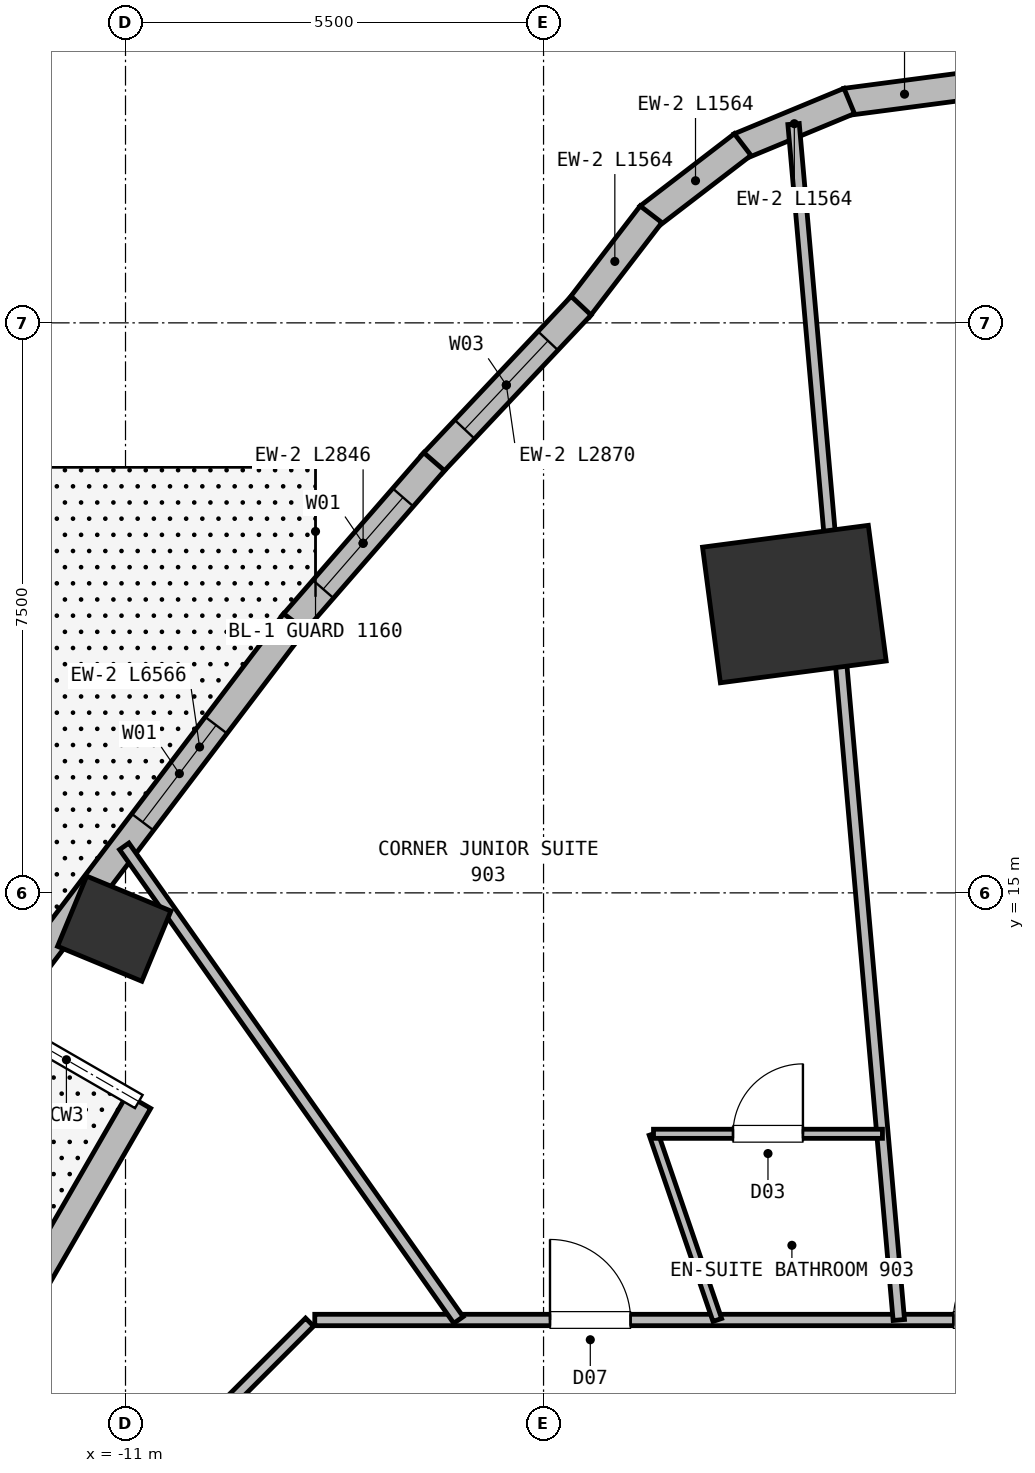
"""IFC4 building model, lengths in metres.
Left out: names, types, materials, properties, quantities, classifications, styles, units other than length and angle.
Written with IfcOpenShell. Run it as: python <this file> out.ifc"""

import sys

from ifc_helpers import new_model, si_unit, direction, frame, frame_2d, origin, origin_2d, place, context, subcontext, project, spatial, rectangle, extrude, element, fill, save


model = new_model("IFC4")
c1 = context("Model", 3, precision=1e-05, world=origin(), true_north=direction((0.0, 1.0)))
c2 = subcontext(c1, "Body", "Model", "MODEL_VIEW")
j1 = project(units=[si_unit("LENGTHUNIT", "METRE"), si_unit("PLANEANGLEUNIT", "RADIAN")], contexts=[c1])
p1 = place(None, origin())
s1 = spatial("IfcSite", under=j1, at=p1, CompositionType="ELEMENT")
p2 = place(p1, origin())
s2 = spatial("IfcBuilding", under=s1, at=p2, CompositionType="ELEMENT")
p3 = place(p2, frame((0.0, 0.0, 30.5)))
s3 = spatial("IfcBuildingStorey", under=s2, at=p3, CompositionType="ELEMENT", Elevation=30.5)
p4 = place(p3, frame((-2.2, 18.8, 0.0), z_axis=(0.0, 0.0, 1.0), x_axis=(-0.13052619222, 0.991444861374, 0.0)))
e1 = element("IfcColumn", 1, at=p4, inside=s3, PredefinedType="COLUMN", context=c2, shape_type="SweptSolid", body=[
    extrude(rectangle(XDim=1.8, YDim=2.2, at=origin_2d()), origin(), (0.0, 0.0, 1.0), 3.75),
])
p5 = place(p3, frame((-11.148, 14.529, 0.0), z_axis=(0.0, 0.0, 1.0), x_axis=(0.382683432365, 0.923879532511, 0.0)))
e2 = element("IfcColumn", 2, at=p5, inside=s3, PredefinedType="COLUMN", context=c2, shape_type="SweptSolid", body=[
    extrude(rectangle(XDim=1.0, YDim=1.2, at=origin_2d()), origin(), (0.0, 0.0, 1.0), 3.75),
])
p6 = place(p3, frame((-16.025, 3.248, 0.0), z_axis=(0.0, 0.0, 1.0), x_axis=(0.499999493275, 0.866025696342, 0.0)))
e3 = element("IfcWall", 3, at=p6, inside=s3, PredefinedType="SOLIDWALL", context=c2, shape_type="SweptSolid", body=[
    extrude(rectangle(XDim=10.4, YDim=0.36, at=frame_2d((5.2, 0.0))), origin(), (0.0, 0.0, 1.0), 3.5),
])
p7 = place(p6, frame((4.375, 0.0, 0.0)))
e4 = element("IfcOpeningElement", 4, at=p7, cuts=e3, PredefinedType="OPENING", context=c2, shape_type="SweptSolid", body=[
    extrude(rectangle(XDim=1.65, YDim=2.25, at=frame_2d((0.825, 1.125))), frame((0.0, 0.19, 0.0), z_axis=(0.0, -1.0, 0.0), x_axis=(1.0, 0.0, 0.0)), (0.0, 0.0, 1.0), 0.38),
])
for number, where, z_axis, x_axis in (
    (5, (-1.526, 25.407, 0.0), (0.0, 0.0, 1.0), (0.991, 0.13, 0.0)),
    (6, (-2.923, 24.821, 0.0), (0.0, 0.0, 1.0), (0.924, 0.383, 0.0)),
    (7, (-4.121, 23.894, 0.0), (0.0, 0.0, 1.0), (0.793, 0.609, 0.0)),
    (8, (-5.038, 22.688, 0.0), (0.0, 0.0, 1.0), (0.609, 0.793, 0.0)),
):
    element("IfcWall", number, at=place(p3, frame(where, z_axis=z_axis, x_axis=x_axis)), inside=s3, PredefinedType="SOLIDWALL", context=c2, shape_type="SweptSolid", body=[
        extrude(rectangle(XDim=1.564, YDim=0.36, at=frame_2d((0.782, 0.0))), origin(), (0.0, 0.0, 1.0), 3.5),
    ])
p8 = place(p3, frame((-6.973, 20.637, 0.0), z_axis=(0.0, 0.0, 1.0), x_axis=(0.685563685899, 0.728012659626, 0.0)))
e9 = element("IfcWall", 9, at=p8, inside=s3, PredefinedType="SOLIDWALL", context=c2, shape_type="SweptSolid", body=[
    extrude(rectangle(XDim=2.87, YDim=0.36, at=frame_2d((1.435, 0.0))), origin(), (0.0, 0.0, 1.0), 3.5),
])
p9 = place(p8, frame((0.635, 0.0, 0.72)))
e10 = element("IfcOpeningElement", 10, at=p9, cuts=e9, PredefinedType="OPENING", context=c2, shape_type="SweptSolid", body=[
    extrude(rectangle(XDim=1.6, YDim=1.88, at=frame_2d((0.8, 0.94))), frame((0.0, 0.19, 0.0), z_axis=(0.0, -1.0, 0.0), x_axis=(1.0, 0.0, 0.0)), (0.0, 0.0, 1.0), 0.38),
])
p10 = place(p3, frame((-8.808, 18.526, 0.0), z_axis=(0.0, 0.0, 1.0), x_axis=(0.656480194697, 0.754343260042, 0.0)))
e11 = element("IfcWall", 11, at=p10, inside=s3, PredefinedType="SOLIDWALL", context=c2, shape_type="SweptSolid", body=[
    extrude(rectangle(XDim=2.846, YDim=0.36, at=frame_2d((1.423, 0.0))), origin(), (0.0, 0.0, 1.0), 3.5),
])
p11 = place(p10, frame((0.623, 0.0, 0.72)))
e12 = element("IfcOpeningElement", 12, at=p11, cuts=e11, PredefinedType="OPENING", context=c2, shape_type="SweptSolid", body=[
    extrude(rectangle(XDim=1.6, YDim=1.88, at=frame_2d((0.8, 0.94))), frame((0.0, 0.19, 0.0), z_axis=(0.0, -1.0, 0.0), x_axis=(1.0, 0.0, 0.0)), (0.0, 0.0, 1.0), 0.38),
])
p12 = place(p3, frame((-12.745, 13.334, 0.0), z_axis=(0.0, 0.0, 1.0), x_axis=(0.604405198851, 0.796677071091, 0.0)))
e13 = element("IfcWall", 13, at=p12, inside=s3, PredefinedType="SOLIDWALL", context=c2, shape_type="SweptSolid", body=[
    extrude(rectangle(XDim=6.566, YDim=0.36, at=frame_2d((3.283, 0.0))), origin(), (0.0, 0.0, 1.0), 2.93),
])
p13 = place(p12, frame((3.26, 0.0, 0.72)))
e14 = element("IfcOpeningElement", 14, at=p13, cuts=e13, PredefinedType="OPENING", context=c2, shape_type="SweptSolid", body=[
    extrude(rectangle(XDim=1.6, YDim=1.88, at=frame_2d((0.8, 0.94))), frame((0.0, 0.19, 0.0), z_axis=(0.0, -1.0, 0.0), x_axis=(1.0, 0.0, 0.0)), (0.0, 0.0, 1.0), 0.38),
])
p14 = place(p3, frame((-8.51, 9.38, 0.0), z_axis=(0.0, 0.0, 1.0), x_axis=(1.0, 0.0, 0.0)))
e15 = element("IfcWall", 15, at=p14, inside=s3, PredefinedType="PARTITIONING", context=c2, shape_type="SweptSolid", body=[
    extrude(rectangle(XDim=17.02, YDim=0.15, at=frame_2d((8.51, 0.0))), origin(), (0.0, 0.0, 1.0), 3.5),
])
p15 = place(p14, frame((13.545, 0.0, 0.0)))
e16 = element("IfcOpeningElement", 16, at=p15, cuts=e15, PredefinedType="OPENING", context=c2, shape_type="SweptSolid", body=[
    extrude(rectangle(XDim=1.0, YDim=2.15, at=frame_2d((0.5, 1.075))), frame((0.0, 0.085, 0.0), z_axis=(0.0, -1.0, 0.0), x_axis=(1.0, 0.0, 0.0)), (0.0, 0.0, 1.0), 0.17),
])
p16 = place(p14, frame((3.095, 0.0, 0.0)))
e17 = element("IfcOpeningElement", 17, at=p16, cuts=e15, PredefinedType="OPENING", context=c2, shape_type="SweptSolid", body=[
    extrude(rectangle(XDim=1.06, YDim=2.15, at=frame_2d((0.53, 1.075))), frame((0.0, 0.085, 0.0), z_axis=(0.0, -1.0, 0.0), x_axis=(1.0, 0.0, 0.0)), (0.0, 0.0, 1.0), 0.17),
])
p17 = place(p14, frame((8.402, 0.0, 0.0)))
e18 = element("IfcOpeningElement", 18, at=p17, cuts=e15, PredefinedType="OPENING", context=c2, shape_type="SweptSolid", body=[
    extrude(rectangle(XDim=1.06, YDim=2.15, at=frame_2d((0.53, 1.075))), frame((0.0, 0.085, 0.0), z_axis=(0.0, -1.0, 0.0), x_axis=(1.0, 0.0, 0.0)), (0.0, 0.0, 1.0), 0.17),
])
p18 = place(p3, frame((-10.752, 7.178, 0.0), z_axis=(0.0, 0.0, 1.0), x_axis=(0.707067066127, 0.707146494016, 0.0)))
e19 = element("IfcWall", 19, at=p18, inside=s3, PredefinedType="PARTITIONING", context=c2, shape_type="SweptSolid", body=[
    extrude(rectangle(XDim=3.074, YDim=0.15, at=frame_2d((1.537, 0.0))), origin(), (0.0, 0.0, 1.0), 3.5),
])
p19 = place(p3, frame((-0.826, 9.38, 0.0), z_axis=(0.0, 0.0, 1.0), x_axis=(-0.087674603254, 0.996149167517, 0.0)))
e20 = element("IfcWall", 20, at=p19, inside=s3, PredefinedType="PARTITIONING", context=c2, shape_type="SweptSolid", body=[
    extrude(rectangle(XDim=15.797, YDim=0.15, at=frame_2d((7.898, 0.0))), origin(), (0.0, 0.0, 1.0), 3.5),
])
p20 = place(p3, frame((-4.053, 11.83, 0.0), z_axis=(0.0, 0.0, 1.0), x_axis=(0.324078497959, -0.946030193578, 0.0)))
e21 = element("IfcWall", 21, at=p20, inside=s3, PredefinedType="PARTITIONING", context=c2, shape_type="SweptSolid", body=[
    extrude(rectangle(XDim=2.59, YDim=0.12, at=frame_2d((1.295, 0.0))), origin(), (0.0, 0.0, 1.0), 3.5),
])
p21 = place(p3, frame((-4.053, 11.83, 0.0), z_axis=(0.0, 0.0, 1.0), x_axis=(1.0, 0.0, 0.0)))
e22 = element("IfcWall", 22, at=p21, inside=s3, PredefinedType="PARTITIONING", context=c2, shape_type="SweptSolid", body=[
    extrude(rectangle(XDim=3.012, YDim=0.12, at=frame_2d((1.506, 0.0))), origin(), (0.0, 0.0, 1.0), 3.5),
])
p22 = place(p21, frame((1.046, 0.0, 0.0)))
e23 = element("IfcOpeningElement", 23, at=p22, cuts=e22, PredefinedType="OPENING", context=c2, shape_type="SweptSolid", body=[
    extrude(rectangle(XDim=0.92, YDim=2.1, at=frame_2d((0.46, 1.05))), frame((0.0, 0.07, 0.0), z_axis=(0.0, -1.0, 0.0), x_axis=(1.0, 0.0, 0.0)), (0.0, 0.0, 1.0), 0.14),
])
p23 = place(p3, frame((-6.619, 9.38, 0.0), z_axis=(0.0, 0.0, 1.0), x_axis=(-0.576560044714, 0.817054780807, 0.0)))
e24 = element("IfcWall", 24, at=p23, inside=s3, PredefinedType="PARTITIONING", context=c2, shape_type="SweptSolid", body=[
    extrude(rectangle(XDim=7.628, YDim=0.15, at=frame_2d((3.814, 0.0))), origin(), (0.0, 0.0, 1.0), 3.5),
])
p24 = place(p9, origin())
e25 = element("IfcWindow", 25, at=p24, inside=s3, PartitioningType="SINGLE_PANEL", PredefinedType="WINDOW", context=c2, shape_type="SweptSolid", body=[
    extrude(rectangle(XDim=1.6, YDim=1.88, at=frame_2d((0.8, 0.94))), frame((0.0, 0.03, 0.0), z_axis=(0.0, -1.0, 0.0), x_axis=(1.0, 0.0, 0.0)), (0.0, 0.0, 1.0), 0.06),
])
fill(e10, e25)
p25 = place(p11, origin())
e26 = element("IfcWindow", 26, at=p25, inside=s3, PartitioningType="SINGLE_PANEL", PredefinedType="WINDOW", context=c2, shape_type="SweptSolid", body=[
    extrude(rectangle(XDim=1.6, YDim=1.88, at=frame_2d((0.8, 0.94))), frame((0.0, 0.03, 0.0), z_axis=(0.0, -1.0, 0.0), x_axis=(1.0, 0.0, 0.0)), (0.0, 0.0, 1.0), 0.06),
])
fill(e12, e26)
p26 = place(p13, origin())
e27 = element("IfcWindow", 27, at=p26, inside=s3, PartitioningType="SINGLE_PANEL", PredefinedType="WINDOW", context=c2, shape_type="SweptSolid", body=[
    extrude(rectangle(XDim=1.6, YDim=1.88, at=frame_2d((0.8, 0.94))), frame((0.0, 0.03, 0.0), z_axis=(0.0, -1.0, 0.0), x_axis=(1.0, 0.0, 0.0)), (0.0, 0.0, 1.0), 0.06),
])
fill(e14, e27)
p27 = place(p22, origin())
e28 = element("IfcDoor", 28, at=p27, inside=s3, OperationType="SINGLE_SWING_RIGHT", PredefinedType="DOOR", context=c2, shape_type="SweptSolid", body=[
    extrude(rectangle(XDim=0.92, YDim=2.1, at=frame_2d((0.46, 1.05))), frame((0.0, 0.025, 0.0), z_axis=(0.0, -1.0, 0.0), x_axis=(1.0, 0.0, 0.0)), (0.0, 0.0, 1.0), 0.05),
])
fill(e23, e28)
p28 = place(p16, origin())
e29 = element("IfcDoor", 29, at=p28, inside=s3, OperationType="SINGLE_SWING_LEFT", PredefinedType="DOOR", context=c2, shape_type="SweptSolid", body=[
    extrude(rectangle(XDim=1.06, YDim=2.15, at=frame_2d((0.53, 1.075))), frame((0.0, 0.025, 0.0), z_axis=(0.0, -1.0, 0.0), x_axis=(1.0, 0.0, 0.0)), (0.0, 0.0, 1.0), 0.05),
])
fill(e17, e29)
p29 = place(p17, origin())
e30 = element("IfcDoor", 30, at=p29, inside=s3, OperationType="SINGLE_SWING_RIGHT", PredefinedType="DOOR", context=c2, shape_type="SweptSolid", body=[
    extrude(rectangle(XDim=1.06, YDim=2.15, at=frame_2d((0.53, 1.075))), frame((0.0, 0.025, 0.0), z_axis=(0.0, -1.0, 0.0), x_axis=(1.0, 0.0, 0.0)), (0.0, 0.0, 1.0), 0.05),
])
fill(e18, e30)
save(model, sys.argv[1])
